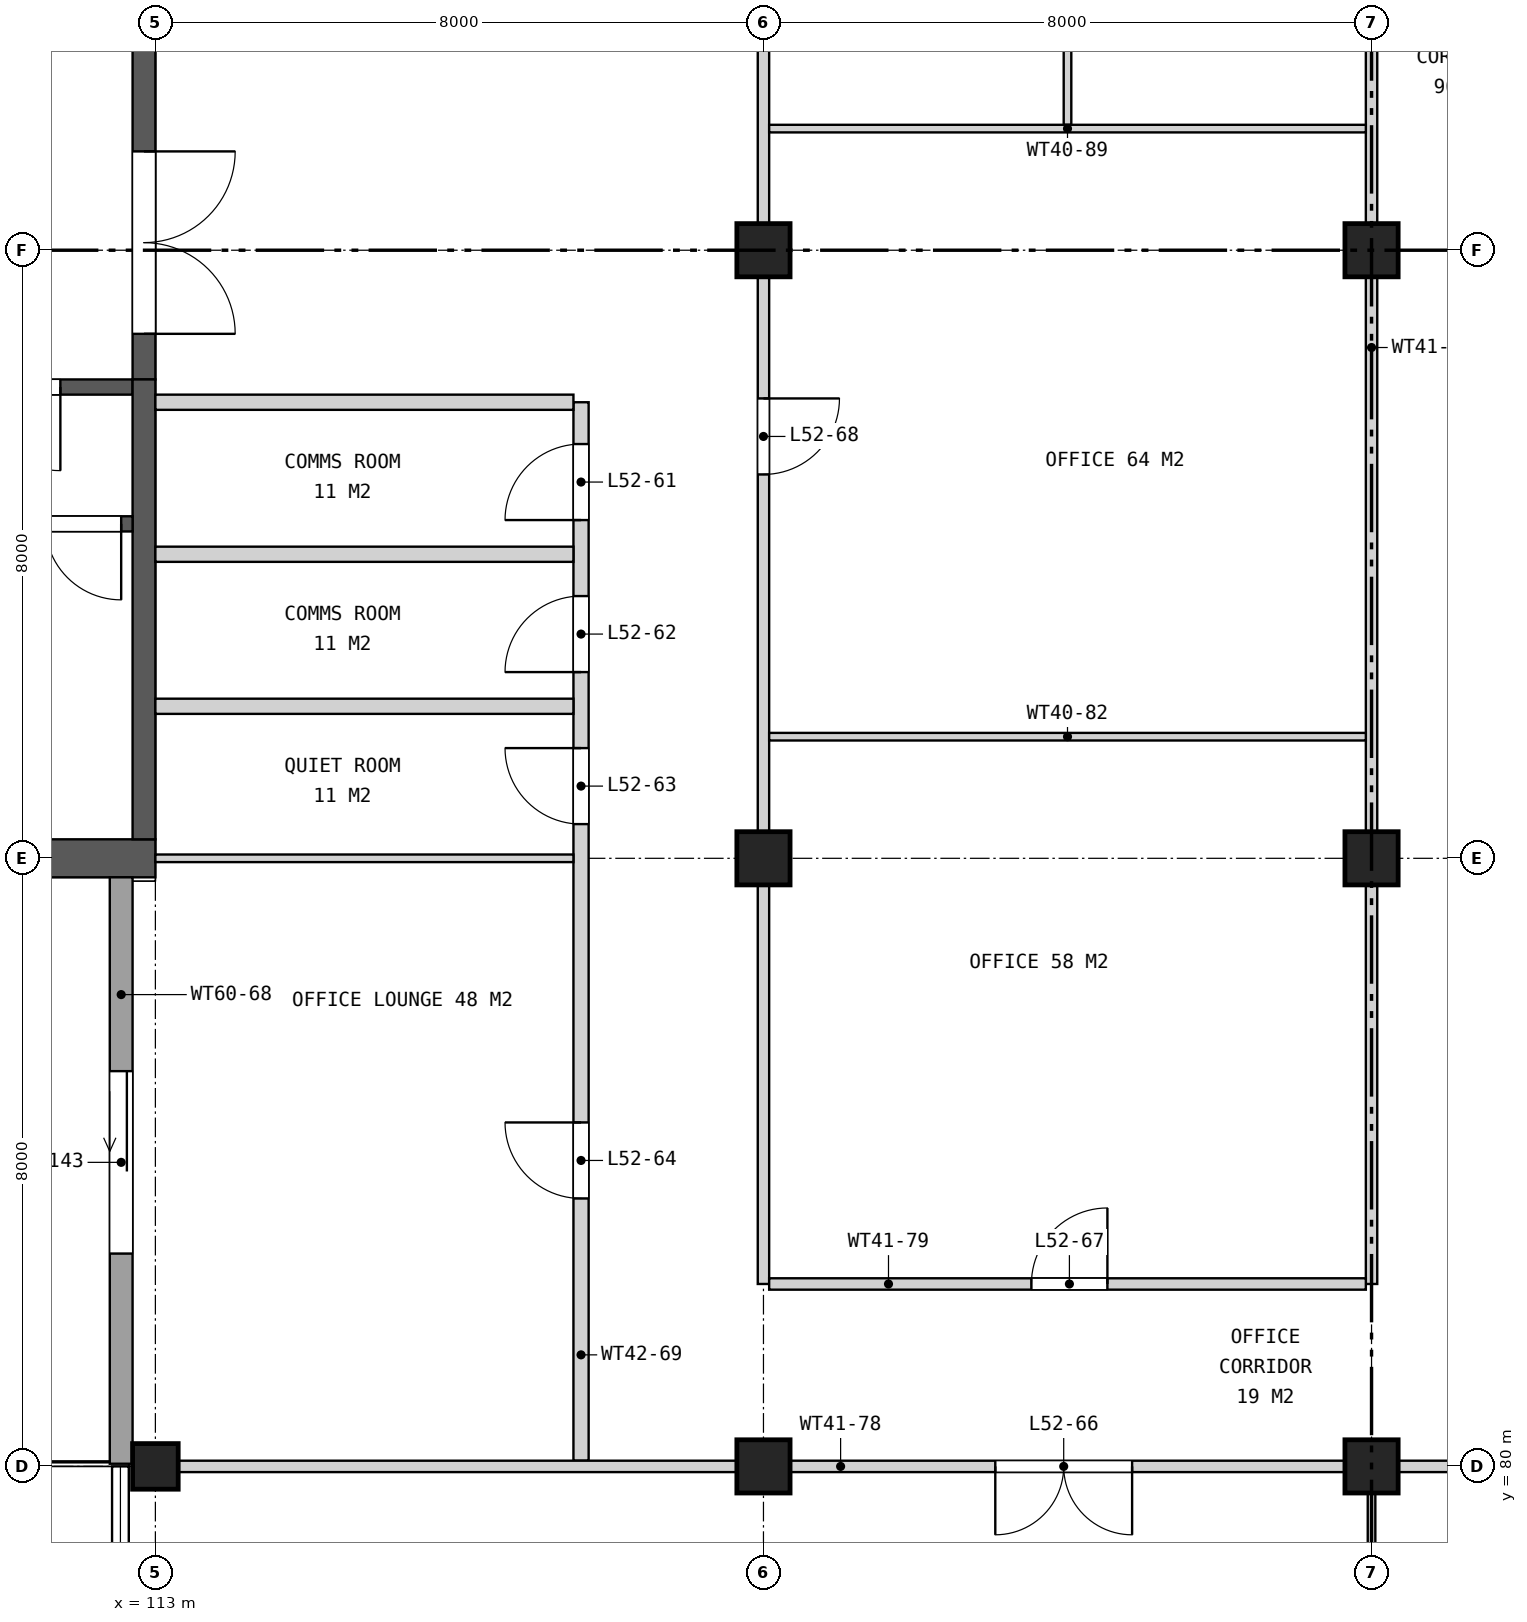
"""IFC4 building model, lengths in metres.
Left out: names, types, materials, properties, quantities, classifications, styles, units other than length and angle.
Written with IfcOpenShell. Run it as: python <this file> out.ifc"""

import sys

from ifc_helpers import new_model, si_unit, direction, frame, frame_2d, origin, origin_2d, place, context, subcontext, project, spatial, rectangle, extrude, element, fill, save


model = new_model("IFC4")
c1 = context("Model", 3, precision=1e-05, world=origin(), true_north=direction((0.0, 1.0)))
c2 = subcontext(c1, "Body", "Model", "MODEL_VIEW")
j1 = project(units=[si_unit("LENGTHUNIT", "METRE"), si_unit("PLANEANGLEUNIT", "RADIAN")], contexts=[c1])
p1 = place(None, origin())
s1 = spatial("IfcSite", under=j1, at=p1, CompositionType="ELEMENT")
p2 = place(p1, origin())
s2 = spatial("IfcBuilding", under=s1, at=p2, CompositionType="ELEMENT")
p3 = place(p2, frame((0.0, 0.0, 245.1)))
s3 = spatial("IfcBuildingStorey", under=s2, at=p3, CompositionType="ELEMENT", Elevation=245.1)
p4 = place(p3, frame((113.0, 80.0, 0.0), z_axis=(0.0, 0.0, 1.0), x_axis=(1.0, 0.0, 0.0)))
e1 = element("IfcColumn", 1, at=p4, inside=s3, PredefinedType="COLUMN", context=c2, shape_type="SweptSolid", body=[
    extrude(rectangle(XDim=0.6, YDim=0.6, at=origin_2d()), origin(), (0.0, 0.0, 1.0), 4.2),
])
for number, where, z_axis, x_axis in (
    (2, (121.0, 80.0, 0.0), (0.0, 0.0, 1.0), (1.0, 0.0, 0.0)),
    (3, (121.0, 88.0, 0.0), (0.0, 0.0, 1.0), (1.0, 0.0, 0.0)),
    (4, (121.0, 96.0, 0.0), (0.0, 0.0, 1.0), (1.0, 0.0, 0.0)),
    (5, (129.0, 80.0, 0.0), (0.0, 0.0, 1.0), (1.0, 0.0, 0.0)),
    (6, (129.0, 88.0, 0.0), (0.0, 0.0, 1.0), (1.0, 0.0, 0.0)),
    (7, (129.0, 96.0, 0.0), (0.0, 0.0, 1.0), (1.0, 0.0, 0.0)),
):
    element("IfcColumn", number, at=place(p3, frame(where, z_axis=z_axis, x_axis=x_axis)), inside=s3, PredefinedType="COLUMN", context=c2, shape_type="SweptSolid", body=[
        extrude(rectangle(XDim=0.7, YDim=0.7, at=origin_2d()), origin(), (0.0, 0.0, 1.0), 4.2),
    ])
p5 = place(p3, frame((113.0, 88.0, 0.0), z_axis=(0.0, 0.0, 1.0), x_axis=(-1.0, 0.0, 0.0)))
e8 = element("IfcWall", 8, at=p5, inside=s3, PredefinedType="SHEAR", context=c2, shape_type="SweptSolid", body=[
    extrude(rectangle(XDim=7.1, YDim=0.5, at=frame_2d((3.55, 0.0))), origin(), (0.0, 0.0, 1.0), 4.2),
])
p6 = place(p3, frame((112.85, 105.7, 0.0), z_axis=(0.0, 0.0, 1.0), x_axis=(0.0, -1.0, 0.0)))
e9 = element("IfcWall", 9, at=p6, inside=s3, PredefinedType="SHEAR", context=c2, shape_type="SweptSolid", body=[
    extrude(rectangle(XDim=11.4, YDim=0.3, at=frame_2d((5.7, 0.0))), origin(), (0.0, 0.0, 1.0), 4.2),
])
p7 = place(p6, frame((0.6, 0.0, 0.0)))
e10 = element("IfcOpeningElement", 10, at=p7, cuts=e9, PredefinedType="OPENING", context=c2, shape_type="SweptSolid", body=[
    extrude(rectangle(XDim=2.4, YDim=2.4, at=frame_2d((1.2, 1.2))), frame((0.0, 0.16, 0.0), z_axis=(0.0, -1.0, 0.0), x_axis=(1.0, 0.0, 0.0)), (0.0, 0.0, 1.0), 0.32),
])
p8 = place(p6, frame((4.5, 0.0, 0.0)))
e11 = element("IfcOpeningElement", 11, at=p8, cuts=e9, PredefinedType="OPENING", context=c2, shape_type="SweptSolid", body=[
    extrude(rectangle(XDim=2.4, YDim=2.4, at=frame_2d((1.2, 1.2))), frame((0.0, 0.16, 0.0), z_axis=(0.0, -1.0, 0.0), x_axis=(1.0, 0.0, 0.0)), (0.0, 0.0, 1.0), 0.32),
])
p9 = place(p6, frame((8.4, 0.0, 0.0)))
e12 = element("IfcOpeningElement", 12, at=p9, cuts=e9, PredefinedType="OPENING", context=c2, shape_type="SweptSolid", body=[
    extrude(rectangle(XDim=2.4, YDim=2.4, at=frame_2d((1.2, 1.2))), frame((0.0, 0.16, 0.0), z_axis=(0.0, -1.0, 0.0), x_axis=(1.0, 0.0, 0.0)), (0.0, 0.0, 1.0), 0.32),
])
p10 = place(p3, frame((112.7, 94.2, 0.0), z_axis=(0.0, 0.0, 1.0), x_axis=(-1.0, 0.0, 0.0)))
e13 = element("IfcWall", 13, at=p10, inside=s3, PredefinedType="SHEAR", context=c2, shape_type="SweptSolid", body=[
    extrude(rectangle(XDim=15.45, YDim=0.2, at=frame_2d((7.725, 0.0))), origin(), (0.0, 0.0, 1.0), 4.2),
])
p11 = place(p10, frame((0.95, 0.0, 0.0)))
e14 = element("IfcOpeningElement", 14, at=p11, cuts=e13, PredefinedType="OPENING", context=c2, shape_type="SweptSolid", body=[
    extrude(rectangle(XDim=1.1, YDim=2.1, at=frame_2d((0.55, 1.05))), frame((0.0, 0.11, 0.0), z_axis=(0.0, -1.0, 0.0), x_axis=(1.0, 0.0, 0.0)), (0.0, 0.0, 1.0), 0.22),
])
p12 = place(p3, frame((112.85, 94.3, 0.0), z_axis=(0.0, 0.0, 1.0), x_axis=(0.0, -1.0, 0.0)))
e15 = element("IfcWall", 15, at=p12, inside=s3, PredefinedType="SHEAR", context=c2, shape_type="SweptSolid", body=[
    extrude(rectangle(XDim=6.05, YDim=0.3, at=frame_2d((3.025, 0.0))), origin(), (0.0, 0.0, 1.0), 4.2),
])
p13 = place(p3, frame((112.7, 92.4, 0.0), z_axis=(0.0, 0.0, 1.0), x_axis=(-1.0, 0.0, 0.0)))
e16 = element("IfcWall", 16, at=p13, inside=s3, PredefinedType="SHEAR", context=c2, shape_type="SweptSolid", body=[
    extrude(rectangle(XDim=6.8, YDim=0.2, at=frame_2d((3.4, 0.0))), origin(), (0.0, 0.0, 1.0), 4.2),
])
p14 = place(p13, frame((0.15, 0.0, 0.0)))
e17 = element("IfcOpeningElement", 17, at=p14, cuts=e16, PredefinedType="OPENING", context=c2, shape_type="SweptSolid", body=[
    extrude(rectangle(XDim=1.0, YDim=2.1, at=frame_2d((0.5, 1.05))), frame((0.0, 0.11, 0.0), z_axis=(0.0, -1.0, 0.0), x_axis=(1.0, 0.0, 0.0)), (0.0, 0.0, 1.0), 0.22),
])
p15 = place(p3, frame((112.55, 87.75, 0.0), z_axis=(0.0, 0.0, 1.0), x_axis=(0.0, -1.0, 0.0)))
e18 = element("IfcWall", 18, at=p15, inside=s3, PredefinedType="SOLIDWALL", context=c2, shape_type="SweptSolid", body=[
    extrude(rectangle(XDim=7.715, YDim=0.3, at=frame_2d((3.857, 0.0))), origin(), (0.0, 0.0, 1.0), 3.9),
])
p16 = place(p15, frame((2.55, 0.0, 0.0)))
e19 = element("IfcOpeningElement", 19, at=p16, cuts=e18, PredefinedType="OPENING", context=c2, shape_type="SweptSolid", body=[
    extrude(rectangle(XDim=2.4, YDim=2.4, at=frame_2d((1.2, 1.2))), frame((0.0, 0.16, 0.0), z_axis=(0.0, -1.0, 0.0), x_axis=(1.0, 0.0, 0.0)), (0.0, 0.0, 1.0), 0.32),
])
p17 = place(p3, frame((118.6, 80.075, 0.0), z_axis=(0.0, 0.0, 1.0), x_axis=(0.0, 1.0, 0.0)))
e20 = element("IfcWall", 20, at=p17, inside=s3, PredefinedType="SOLIDWALL", context=c2, shape_type="SweptSolid", body=[
    extrude(rectangle(XDim=13.925, YDim=0.2, at=frame_2d((6.962, 0.0))), origin(), (0.0, 0.0, 1.0), 3.443),
])
p18 = place(p17, frame((12.375, 0.0, 0.0)))
e21 = element("IfcOpeningElement", 21, at=p18, cuts=e20, PredefinedType="OPENING", context=c2, shape_type="SweptSolid", body=[
    extrude(rectangle(XDim=1.0, YDim=2.1, at=frame_2d((0.5, 1.05))), frame((0.0, 0.11, 0.0), z_axis=(0.0, -1.0, 0.0), x_axis=(1.0, 0.0, 0.0)), (0.0, 0.0, 1.0), 0.22),
])
p19 = place(p17, frame((10.375, 0.0, 0.0)))
e22 = element("IfcOpeningElement", 22, at=p19, cuts=e20, PredefinedType="OPENING", context=c2, shape_type="SweptSolid", body=[
    extrude(rectangle(XDim=1.0, YDim=2.1, at=frame_2d((0.5, 1.05))), frame((0.0, 0.11, 0.0), z_axis=(0.0, -1.0, 0.0), x_axis=(1.0, 0.0, 0.0)), (0.0, 0.0, 1.0), 0.22),
])
p20 = place(p17, frame((8.375, 0.0, 0.0)))
e23 = element("IfcOpeningElement", 23, at=p20, cuts=e20, PredefinedType="OPENING", context=c2, shape_type="SweptSolid", body=[
    extrude(rectangle(XDim=1.0, YDim=2.1, at=frame_2d((0.5, 1.05))), frame((0.0, 0.11, 0.0), z_axis=(0.0, -1.0, 0.0), x_axis=(1.0, 0.0, 0.0)), (0.0, 0.0, 1.0), 0.22),
])
p21 = place(p17, frame((3.45, 0.0, 0.0)))
e24 = element("IfcOpeningElement", 24, at=p21, cuts=e20, PredefinedType="OPENING", context=c2, shape_type="SweptSolid", body=[
    extrude(rectangle(XDim=1.0, YDim=2.1, at=frame_2d((0.5, 1.05))), frame((0.0, 0.11, 0.0), z_axis=(0.0, -1.0, 0.0), x_axis=(1.0, 0.0, 0.0)), (0.0, 0.0, 1.0), 0.22),
])
p22 = place(p3, frame((121.0, 82.4, 0.0), z_axis=(0.0, 0.0, 1.0), x_axis=(0.0, 1.0, 0.0)))
e25 = element("IfcWall", 25, at=p22, inside=s3, PredefinedType="PARTITIONING", context=c2, shape_type="SweptSolid", body=[
    extrude(rectangle(XDim=35.2, YDim=0.15, at=frame_2d((17.6, 0.0))), origin(), (0.0, 0.0, 1.0), 3.443),
])
p23 = place(p22, frame((10.65, 0.0, 0.0)))
e26 = element("IfcOpeningElement", 26, at=p23, cuts=e25, PredefinedType="OPENING", context=c2, shape_type="SweptSolid", body=[
    extrude(rectangle(XDim=1.0, YDim=2.1, at=frame_2d((0.5, 1.05))), frame((0.0, 0.085, 0.0), z_axis=(0.0, -1.0, 0.0), x_axis=(1.0, 0.0, 0.0)), (0.0, 0.0, 1.0), 0.17),
])
p24 = place(p22, frame((18.75, 0.0, 0.0)))
e27 = element("IfcOpeningElement", 27, at=p24, cuts=e25, PredefinedType="OPENING", context=c2, shape_type="SweptSolid", body=[
    extrude(rectangle(XDim=1.0, YDim=2.1, at=frame_2d((0.5, 1.05))), frame((0.0, 0.085, 0.0), z_axis=(0.0, -1.0, 0.0), x_axis=(1.0, 0.0, 0.0)), (0.0, 0.0, 1.0), 0.17),
])
p25 = place(p22, frame((26.35, 0.0, 0.0)))
e28 = element("IfcOpeningElement", 28, at=p25, cuts=e25, PredefinedType="OPENING", context=c2, shape_type="SweptSolid", body=[
    extrude(rectangle(XDim=1.0, YDim=2.1, at=frame_2d((0.5, 1.05))), frame((0.0, 0.085, 0.0), z_axis=(0.0, -1.0, 0.0), x_axis=(1.0, 0.0, 0.0)), (0.0, 0.0, 1.0), 0.17),
])
p26 = place(p3, frame((125.0, 97.65, 0.0), z_axis=(0.0, 0.0, 1.0), x_axis=(0.0, 1.0, 0.0)))
e29 = element("IfcWall", 29, at=p26, inside=s3, PredefinedType="PARTITIONING", context=c2, shape_type="SweptSolid", body=[
    extrude(rectangle(XDim=7.9, YDim=0.1, at=frame_2d((3.95, 0.0))), origin(), (0.0, 0.0, 1.0), 3.443),
])
p27 = place(p3, frame((129.0, 71.73, 0.0), z_axis=(0.0, 0.0, 1.0), x_axis=(0.0, 1.0, 0.0)))
e30 = element("IfcWall", 30, at=p27, inside=s3, PredefinedType="PARTITIONING", context=c2, shape_type="SweptSolid", body=[
    extrude(rectangle(XDim=8.195, YDim=0.1, at=frame_2d((4.098, 0.0))), origin(), (0.0, 0.0, 1.0), 3.443),
])
p28 = place(p3, frame((129.0, 82.4, 0.0), z_axis=(0.0, 0.0, 1.0), x_axis=(0.0, 1.0, 0.0)))
e31 = element("IfcWall", 31, at=p28, inside=s3, PredefinedType="PARTITIONING", context=c2, shape_type="SweptSolid", body=[
    extrude(rectangle(XDim=35.2, YDim=0.15, at=frame_2d((17.6, 0.0))), origin(), (0.0, 0.0, 1.0), 3.443),
])
p29 = place(p28, frame((18.75, 0.0, 0.0)))
e32 = element("IfcOpeningElement", 32, at=p29, cuts=e31, PredefinedType="OPENING", context=c2, shape_type="SweptSolid", body=[
    extrude(rectangle(XDim=1.0, YDim=2.1, at=frame_2d((0.5, 1.05))), frame((0.0, 0.085, 0.0), z_axis=(0.0, -1.0, 0.0), x_axis=(1.0, 0.0, 0.0)), (0.0, 0.0, 1.0), 0.17),
])
p30 = place(p3, frame((112.73, 80.0, 0.0), z_axis=(0.0, 0.0, 1.0), x_axis=(1.0, 0.0, 0.0)))
e33 = element("IfcWall", 33, at=p30, inside=s3, PredefinedType="PARTITIONING", context=c2, shape_type="SweptSolid", body=[
    extrude(rectangle(XDim=18.57, YDim=0.15, at=frame_2d((9.285, 0.0))), origin(), (0.0, 0.0, 1.0), 3.443),
])
p31 = place(p30, frame((11.32, 0.0, 0.0)))
e34 = element("IfcOpeningElement", 34, at=p31, cuts=e33, PredefinedType="OPENING", context=c2, shape_type="SweptSolid", body=[
    extrude(rectangle(XDim=1.8, YDim=2.1, at=frame_2d((0.9, 1.05))), frame((0.0, 0.085, 0.0), z_axis=(0.0, -1.0, 0.0), x_axis=(1.0, 0.0, 0.0)), (0.0, 0.0, 1.0), 0.17),
])
p32 = place(p3, frame((121.075, 82.4, 0.0), z_axis=(0.0, 0.0, 1.0), x_axis=(1.0, 0.0, 0.0)))
e35 = element("IfcWall", 35, at=p32, inside=s3, PredefinedType="PARTITIONING", context=c2, shape_type="SweptSolid", body=[
    extrude(rectangle(XDim=7.85, YDim=0.15, at=frame_2d((3.925, 0.0))), origin(), (0.0, 0.0, 1.0), 3.443),
])
p33 = place(p32, frame((3.45, 0.0, 0.0)))
e36 = element("IfcOpeningElement", 36, at=p33, cuts=e35, PredefinedType="OPENING", context=c2, shape_type="SweptSolid", body=[
    extrude(rectangle(XDim=1.0, YDim=2.1, at=frame_2d((0.5, 1.05))), frame((0.0, 0.085, 0.0), z_axis=(0.0, -1.0, 0.0), x_axis=(1.0, 0.0, 0.0)), (0.0, 0.0, 1.0), 0.17),
])
p34 = place(p3, frame((113.0, 88.0, 0.0), z_axis=(0.0, 0.0, 1.0), x_axis=(1.0, 0.0, 0.0)))
e37 = element("IfcWall", 37, at=p34, inside=s3, PredefinedType="PARTITIONING", context=c2, shape_type="SweptSolid", body=[
    extrude(rectangle(XDim=5.5, YDim=0.1, at=frame_2d((2.75, 0.0))), origin(), (0.0, 0.0, 1.0), 3.443),
])
p35 = place(p3, frame((121.075, 89.6, 0.0), z_axis=(0.0, 0.0, 1.0), x_axis=(1.0, 0.0, 0.0)))
e38 = element("IfcWall", 38, at=p35, inside=s3, PredefinedType="PARTITIONING", context=c2, shape_type="SweptSolid", body=[
    extrude(rectangle(XDim=7.85, YDim=0.1, at=frame_2d((3.925, 0.0))), origin(), (0.0, 0.0, 1.0), 3.443),
])
for number, where, z_axis, x_axis in (
    (39, (113.0, 90.0, 0.0), (0.0, 0.0, 1.0), (1.0, 0.0, 0.0)),
    (40, (113.0, 92.0, 0.0), (0.0, 0.0, 1.0), (1.0, 0.0, 0.0)),
    (41, (113.0, 94.0, 0.0), (0.0, 0.0, 1.0), (1.0, 0.0, 0.0)),
):
    element("IfcWall", number, at=place(p3, frame(where, z_axis=z_axis, x_axis=x_axis)), inside=s3, PredefinedType="SOLIDWALL", context=c2, shape_type="SweptSolid", body=[
        extrude(rectangle(XDim=5.5, YDim=0.2, at=frame_2d((2.75, 0.0))), origin(), (0.0, 0.0, 1.0), 3.443),
    ])
p36 = place(p3, frame((121.075, 97.6, 0.0), z_axis=(0.0, 0.0, 1.0), x_axis=(1.0, 0.0, 0.0)))
e42 = element("IfcWall", 42, at=p36, inside=s3, PredefinedType="PARTITIONING", context=c2, shape_type="SweptSolid", body=[
    extrude(rectangle(XDim=7.85, YDim=0.1, at=frame_2d((3.925, 0.0))), origin(), (0.0, 0.0, 1.0), 3.443),
])
p37 = place(p9, origin())
e43 = element("IfcDoor", 43, at=p37, inside=s3, OperationType="DOUBLE_DOOR_SINGLE_SWING", PredefinedType="DOOR", context=c2, shape_type="SweptSolid", body=[
    extrude(rectangle(XDim=2.4, YDim=2.4, at=frame_2d((1.2, 1.2))), frame((0.0, 0.025, 0.0), z_axis=(0.0, -1.0, 0.0), x_axis=(1.0, 0.0, 0.0)), (0.0, 0.0, 1.0), 0.05),
])
fill(e12, e43)
p38 = place(p11, origin())
e44 = element("IfcDoor", 44, at=p38, inside=s3, OperationType="SINGLE_SWING_LEFT", PredefinedType="DOOR", context=c2, shape_type="SweptSolid", body=[
    extrude(rectangle(XDim=1.1, YDim=2.1, at=frame_2d((0.55, 1.05))), frame((0.0, 0.025, 0.0), z_axis=(0.0, -1.0, 0.0), x_axis=(1.0, 0.0, 0.0)), (0.0, 0.0, 1.0), 0.05),
])
fill(e14, e44)
p39 = place(p14, origin())
e45 = element("IfcDoor", 45, at=p39, inside=s3, OperationType="SINGLE_SWING_LEFT", PredefinedType="DOOR", context=c2, shape_type="SweptSolid", body=[
    extrude(rectangle(XDim=1.0, YDim=2.1, at=frame_2d((0.5, 1.05))), frame((0.0, 0.025, 0.0), z_axis=(0.0, -1.0, 0.0), x_axis=(1.0, 0.0, 0.0)), (0.0, 0.0, 1.0), 0.05),
])
fill(e17, e45)
p40 = place(p16, frame((2.4, 0.0, 0.0), z_axis=(0.0, 0.0, 1.0), x_axis=(-1.0, 0.0, 0.0)))
e46 = element("IfcDoor", 46, at=p40, inside=s3, OperationType="SLIDING_TO_LEFT", PredefinedType="DOOR", context=c2, shape_type="SweptSolid", body=[
    extrude(rectangle(XDim=2.4, YDim=2.4, at=frame_2d((1.2, 1.2))), frame((0.0, 0.025, 0.0), z_axis=(0.0, -1.0, 0.0), x_axis=(1.0, 0.0, 0.0)), (0.0, 0.0, 1.0), 0.05),
])
fill(e19, e46)
p41 = place(p18, origin())
e47 = element("IfcDoor", 47, at=p41, inside=s3, OperationType="SINGLE_SWING_LEFT", PredefinedType="DOOR", context=c2, shape_type="SweptSolid", body=[
    extrude(rectangle(XDim=1.0, YDim=2.1, at=frame_2d((0.5, 1.05))), frame((0.0, 0.025, 0.0), z_axis=(0.0, -1.0, 0.0), x_axis=(1.0, 0.0, 0.0)), (0.0, 0.0, 1.0), 0.05),
])
fill(e21, e47)
p42 = place(p19, origin())
e48 = element("IfcDoor", 48, at=p42, inside=s3, OperationType="SINGLE_SWING_LEFT", PredefinedType="DOOR", context=c2, shape_type="SweptSolid", body=[
    extrude(rectangle(XDim=1.0, YDim=2.1, at=frame_2d((0.5, 1.05))), frame((0.0, 0.025, 0.0), z_axis=(0.0, -1.0, 0.0), x_axis=(1.0, 0.0, 0.0)), (0.0, 0.0, 1.0), 0.05),
])
fill(e22, e48)
p43 = place(p20, origin())
e49 = element("IfcDoor", 49, at=p43, inside=s3, OperationType="SINGLE_SWING_RIGHT", PredefinedType="DOOR", context=c2, shape_type="SweptSolid", body=[
    extrude(rectangle(XDim=1.0, YDim=2.1, at=frame_2d((0.5, 1.05))), frame((0.0, 0.025, 0.0), z_axis=(0.0, -1.0, 0.0), x_axis=(1.0, 0.0, 0.0)), (0.0, 0.0, 1.0), 0.05),
])
fill(e23, e49)
p44 = place(p21, origin())
e50 = element("IfcDoor", 50, at=p44, inside=s3, OperationType="SINGLE_SWING_RIGHT", PredefinedType="DOOR", context=c2, shape_type="SweptSolid", body=[
    extrude(rectangle(XDim=1.0, YDim=2.1, at=frame_2d((0.5, 1.05))), frame((0.0, 0.025, 0.0), z_axis=(0.0, -1.0, 0.0), x_axis=(1.0, 0.0, 0.0)), (0.0, 0.0, 1.0), 0.05),
])
fill(e24, e50)
p45 = place(p31, frame((1.8, 0.0, 0.0), z_axis=(0.0, 0.0, 1.0), x_axis=(-1.0, 0.0, 0.0)))
e51 = element("IfcDoor", 51, at=p45, inside=s3, OperationType="DOUBLE_DOOR_SINGLE_SWING", PredefinedType="DOOR", context=c2, shape_type="SweptSolid", body=[
    extrude(rectangle(XDim=1.8, YDim=2.1, at=frame_2d((0.9, 1.05))), frame((0.0, 0.025, 0.0), z_axis=(0.0, -1.0, 0.0), x_axis=(1.0, 0.0, 0.0)), (0.0, 0.0, 1.0), 0.05),
])
fill(e34, e51)
p46 = place(p33, origin())
e52 = element("IfcDoor", 52, at=p46, inside=s3, OperationType="SINGLE_SWING_RIGHT", PredefinedType="DOOR", context=c2, shape_type="SweptSolid", body=[
    extrude(rectangle(XDim=1.0, YDim=2.1, at=frame_2d((0.5, 1.05))), frame((0.0, 0.025, 0.0), z_axis=(0.0, -1.0, 0.0), x_axis=(1.0, 0.0, 0.0)), (0.0, 0.0, 1.0), 0.05),
])
fill(e36, e52)
p47 = place(p23, frame((1.0, 0.0, 0.0), z_axis=(0.0, 0.0, 1.0), x_axis=(-1.0, 0.0, 0.0)))
e53 = element("IfcDoor", 53, at=p47, inside=s3, OperationType="SINGLE_SWING_LEFT", PredefinedType="DOOR", context=c2, shape_type="SweptSolid", body=[
    extrude(rectangle(XDim=1.0, YDim=2.1, at=frame_2d((0.5, 1.05))), frame((0.0, 0.025, 0.0), z_axis=(0.0, -1.0, 0.0), x_axis=(1.0, 0.0, 0.0)), (0.0, 0.0, 1.0), 0.05),
])
fill(e26, e53)
save(model, sys.argv[1])
